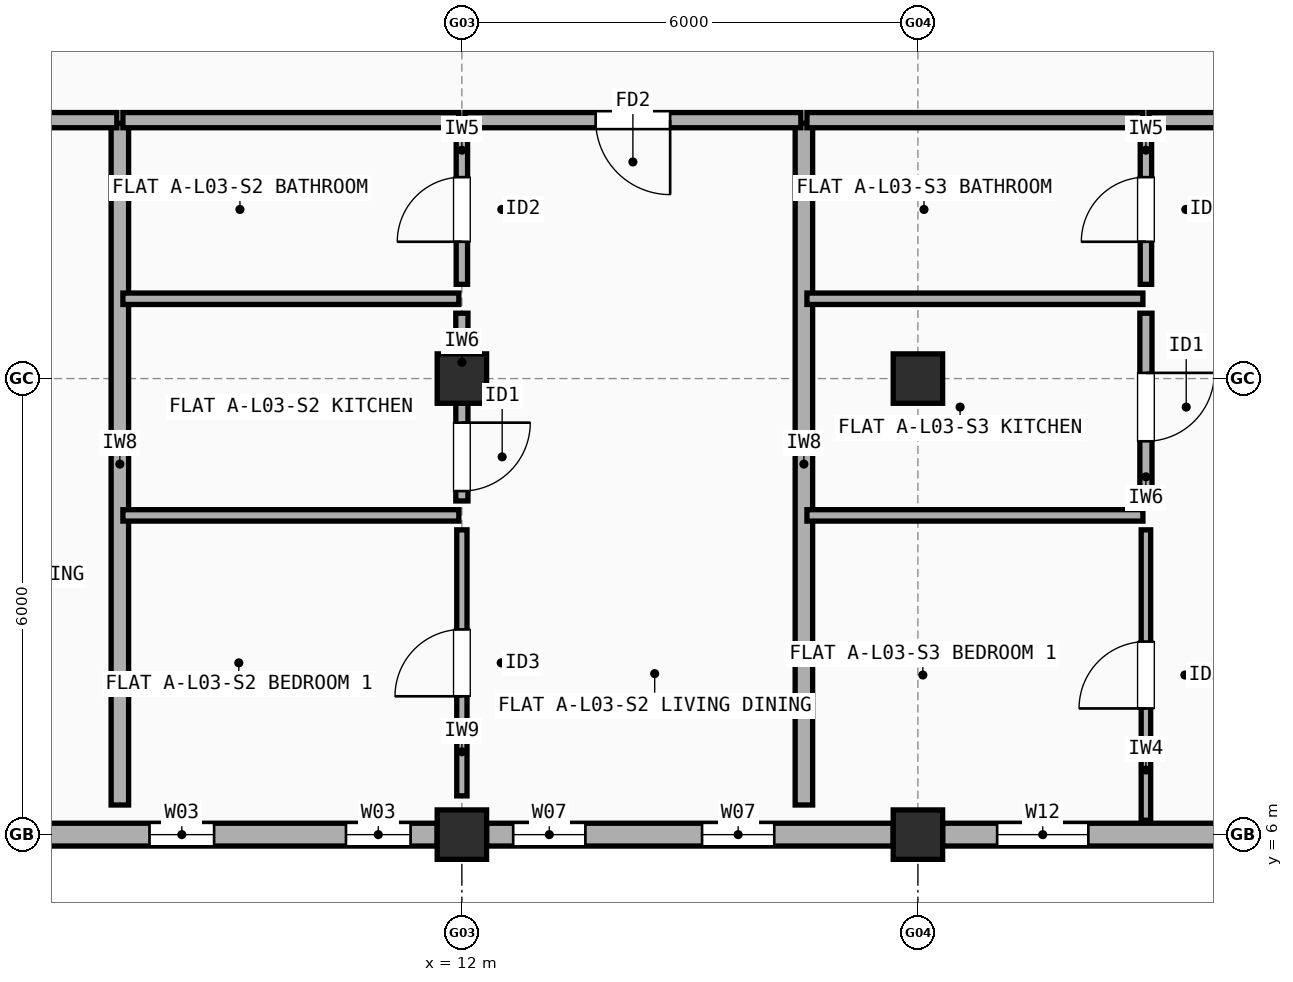
"""IFC4 building model, lengths in metres.
Left out: names, types, materials, properties, quantities, classifications, styles, units other than length and angle.
Written with IfcOpenShell. Run it as: python <this file> out.ifc"""

import sys

from ifc_helpers import new_model, si_unit, direction, frame, frame_2d, origin, origin_2d, place, context, subcontext, project, spatial, rectangle, extrude, element, fill, save


model = new_model("IFC4")
c1 = context("Model", 3, precision=1e-05, world=origin(), true_north=direction((0.0, 1.0)))
c2 = subcontext(c1, "Body", "Model", "MODEL_VIEW")
j1 = project(units=[si_unit("LENGTHUNIT", "METRE"), si_unit("PLANEANGLEUNIT", "RADIAN")], contexts=[c1])
p1 = place(None, origin())
s1 = spatial("IfcSite", under=j1, at=p1, CompositionType="ELEMENT")
p2 = place(p1, origin())
s2 = spatial("IfcBuilding", under=s1, at=p2, CompositionType="ELEMENT")
p3 = place(p2, frame((0.0, 0.0, 10.9)))
s3 = spatial("IfcBuildingStorey", under=s2, at=p3, CompositionType="ELEMENT", Elevation=10.9)
for number, where, z_axis, x_axis in (
    (1, (12.0, 6.0, 0.0), (0.0, 0.0, 1.0), (1.0, 0.0, 0.0)),
    (2, (12.0, 12.0, 0.0), (0.0, 0.0, 1.0), (1.0, 0.0, 0.0)),
    (3, (18.0, 6.0, 0.0), (0.0, 0.0, 1.0), (1.0, 0.0, 0.0)),
    (4, (18.0, 12.0, 0.0), (0.0, 0.0, 1.0), (1.0, 0.0, 0.0)),
):
    element("IfcColumn", number, at=place(p3, frame(where, z_axis=z_axis, x_axis=x_axis)), inside=s3, PredefinedType="COLUMN", context=c2, shape_type="SweptSolid", body=[
        extrude(rectangle(XDim=0.65, YDim=0.65, at=origin_2d()), origin(), (0.0, 0.0, 1.0), 2.96),
    ])
p4 = place(p3, frame((6.325, 6.0, 0.0), z_axis=(0.0, 0.0, 1.0), x_axis=(1.0, 0.0, 0.0)))
e5 = element("IfcWall", 5, at=p4, inside=s3, PredefinedType="STANDARD", context=c2, shape_type="SweptSolid", body=[
    extrude(rectangle(XDim=5.35, YDim=0.3, at=frame_2d((2.675, 0.0))), origin(), (0.0, 0.0, 1.0), 2.442),
])
p5 = place(p4, frame((1.565, 0.0, 0.9)))
e6 = element("IfcOpeningElement", 6, at=p5, cuts=e5, PredefinedType="OPENING", context=c2, shape_type="SweptSolid", body=[
    extrude(rectangle(XDim=0.85, YDim=1.25, at=frame_2d((0.425, 0.625))), frame((0.0, 0.16, 0.0), z_axis=(0.0, -1.0, 0.0), x_axis=(1.0, 0.0, 0.0)), (0.0, 0.0, 1.0), 0.32),
])
p6 = place(p4, frame((4.15, 0.0, 0.9)))
e7 = element("IfcOpeningElement", 7, at=p6, cuts=e5, PredefinedType="OPENING", context=c2, shape_type="SweptSolid", body=[
    extrude(rectangle(XDim=0.85, YDim=1.25, at=frame_2d((0.425, 0.625))), frame((0.0, 0.16, 0.0), z_axis=(0.0, -1.0, 0.0), x_axis=(1.0, 0.0, 0.0)), (0.0, 0.0, 1.0), 0.32),
])
p7 = place(p3, frame((12.325, 6.0, 0.0), z_axis=(0.0, 0.0, 1.0), x_axis=(1.0, 0.0, 0.0)))
e8 = element("IfcWall", 8, at=p7, inside=s3, PredefinedType="STANDARD", context=c2, shape_type="SweptSolid", body=[
    extrude(rectangle(XDim=5.35, YDim=0.3, at=frame_2d((2.675, 0.0))), origin(), (0.0, 0.0, 1.0), 2.442),
])
p8 = place(p7, frame((0.35, 0.0, 0.9)))
e9 = element("IfcOpeningElement", 9, at=p8, cuts=e8, PredefinedType="OPENING", context=c2, shape_type="SweptSolid", body=[
    extrude(rectangle(XDim=0.95, YDim=1.35, at=frame_2d((0.475, 0.675))), frame((0.0, 0.16, 0.0), z_axis=(0.0, -1.0, 0.0), x_axis=(1.0, 0.0, 0.0)), (0.0, 0.0, 1.0), 0.32),
])
p9 = place(p7, frame((2.835, 0.0, 0.9)))
e10 = element("IfcOpeningElement", 10, at=p9, cuts=e8, PredefinedType="OPENING", context=c2, shape_type="SweptSolid", body=[
    extrude(rectangle(XDim=0.95, YDim=1.35, at=frame_2d((0.475, 0.675))), frame((0.0, 0.16, 0.0), z_axis=(0.0, -1.0, 0.0), x_axis=(1.0, 0.0, 0.0)), (0.0, 0.0, 1.0), 0.32),
])
p10 = place(p3, frame((18.325, 6.0, 0.0), z_axis=(0.0, 0.0, 1.0), x_axis=(1.0, 0.0, 0.0)))
e11 = element("IfcWall", 11, at=p10, inside=s3, PredefinedType="STANDARD", context=c2, shape_type="SweptSolid", body=[
    extrude(rectangle(XDim=5.35, YDim=0.3, at=frame_2d((2.675, 0.0))), origin(), (0.0, 0.0, 1.0), 2.442),
])
p11 = place(p10, frame((0.718, 0.0, 0.9)))
e12 = element("IfcOpeningElement", 12, at=p11, cuts=e11, PredefinedType="OPENING", context=c2, shape_type="SweptSolid", body=[
    extrude(rectangle(XDim=1.2, YDim=1.35, at=frame_2d((0.6, 0.675))), frame((0.0, 0.16, 0.0), z_axis=(0.0, -1.0, 0.0), x_axis=(1.0, 0.0, 0.0)), (0.0, 0.0, 1.0), 0.32),
])
p12 = place(p10, frame((3.633, 0.0, 0.9)))
e13 = element("IfcOpeningElement", 13, at=p12, cuts=e11, PredefinedType="OPENING", context=c2, shape_type="SweptSolid", body=[
    extrude(rectangle(XDim=0.8, YDim=1.2, at=frame_2d((0.4, 0.6))), frame((0.0, 0.16, 0.0), z_axis=(0.0, -1.0, 0.0), x_axis=(1.0, 0.0, 0.0)), (0.0, 0.0, 1.0), 0.32),
])
p13 = place(p3, frame((7.5, 6.39, 0.0), z_axis=(0.0, 0.0, 1.0), x_axis=(0.0, 1.0, 0.0)))
e14 = element("IfcWall", 14, at=p13, inside=s3, PredefinedType="SOLIDWALL", context=c2, shape_type="SweptSolid", body=[
    extrude(rectangle(XDim=8.97, YDim=0.23, at=frame_2d((4.485, 0.0))), origin(), (0.0, 0.0, 1.0), 2.548),
])
p14 = place(p3, frame((3.04, 15.4, 0.0), z_axis=(0.0, 0.0, 1.0), x_axis=(1.0, 0.0, 0.0)))
e15 = element("IfcWall", 15, at=p14, inside=s3, PredefinedType="SOLIDWALL", context=c2, shape_type="SweptSolid", body=[
    extrude(rectangle(XDim=4.42, YDim=0.2, at=frame_2d((2.21, 0.0))), origin(), (0.0, 0.0, 1.0), 2.508),
])
p15 = place(p14, frame((1.71, 0.0, 0.0)))
e16 = element("IfcOpeningElement", 16, at=p15, cuts=e15, PredefinedType="OPENING", context=c2, shape_type="SweptSolid", body=[
    extrude(rectangle(XDim=1.0, YDim=2.15, at=frame_2d((0.5, 1.075))), frame((0.0, 0.11, 0.0), z_axis=(0.0, -1.0, 0.0), x_axis=(1.0, 0.0, 0.0)), (0.0, 0.0, 1.0), 0.22),
])
p16 = place(p3, frame((16.5, 6.39, 0.0), z_axis=(0.0, 0.0, 1.0), x_axis=(0.0, 1.0, 0.0)))
e17 = element("IfcWall", 17, at=p16, inside=s3, PredefinedType="SOLIDWALL", context=c2, shape_type="SweptSolid", body=[
    extrude(rectangle(XDim=8.97, YDim=0.23, at=frame_2d((4.485, 0.0))), origin(), (0.0, 0.0, 1.0), 2.508),
])
p17 = place(p3, frame((7.54, 15.4, 0.0), z_axis=(0.0, 0.0, 1.0), x_axis=(1.0, 0.0, 0.0)))
e18 = element("IfcWall", 18, at=p17, inside=s3, PredefinedType="SOLIDWALL", context=c2, shape_type="SweptSolid", body=[
    extrude(rectangle(XDim=4.42, YDim=0.2, at=frame_2d((2.21, 0.0))), origin(), (0.0, 0.0, 1.0), 2.458),
])
p18 = place(p3, frame((12.04, 15.4, 0.0), z_axis=(0.0, 0.0, 1.0), x_axis=(1.0, 0.0, 0.0)))
e19 = element("IfcWall", 19, at=p18, inside=s3, PredefinedType="SOLIDWALL", context=c2, shape_type="SweptSolid", body=[
    extrude(rectangle(XDim=4.42, YDim=0.2, at=frame_2d((2.21, 0.0))), origin(), (0.0, 0.0, 1.0), 2.458),
])
p19 = place(p18, frame((1.72, 0.0, 0.0)))
e20 = element("IfcOpeningElement", 20, at=p19, cuts=e19, PredefinedType="OPENING", context=c2, shape_type="SweptSolid", body=[
    extrude(rectangle(XDim=0.98, YDim=2.15, at=frame_2d((0.49, 1.075))), frame((0.0, 0.11, 0.0), z_axis=(0.0, -1.0, 0.0), x_axis=(1.0, 0.0, 0.0)), (0.0, 0.0, 1.0), 0.22),
])
p20 = place(p3, frame((12.0, 6.51, 0.0), z_axis=(0.0, 0.0, 1.0), x_axis=(0.0, 1.0, 0.0)))
e21 = element("IfcWall", 21, at=p20, inside=s3, PredefinedType="PARTITIONING", context=c2, shape_type="SweptSolid", body=[
    extrude(rectangle(XDim=3.5, YDim=0.135, at=frame_2d((1.75, 0.0))), origin(), (0.0, 0.0, 1.0), 2.508),
])
p21 = place(p20, frame((1.31, 0.0, 0.0)))
e22 = element("IfcOpeningElement", 22, at=p21, cuts=e21, PredefinedType="OPENING", context=c2, shape_type="SweptSolid", body=[
    extrude(rectangle(XDim=0.88, YDim=2.1, at=frame_2d((0.44, 1.05))), frame((0.0, 0.077, 0.0), z_axis=(0.0, -1.0, 0.0), x_axis=(1.0, 0.0, 0.0)), (0.0, 0.0, 1.0), 0.155),
])
p22 = place(p3, frame((12.0, 10.39, 0.0), z_axis=(0.0, 0.0, 1.0), x_axis=(0.0, 1.0, 0.0)))
e23 = element("IfcWall", 23, at=p22, inside=s3, PredefinedType="PLUMBINGWALL", context=c2, shape_type="SweptSolid", body=[
    extrude(rectangle(XDim=2.47, YDim=0.16, at=frame_2d((1.235, 0.0))), origin(), (0.0, 0.0, 1.0), 2.458),
])
p23 = place(p22, frame((0.13, 0.0, 0.0)))
e24 = element("IfcOpeningElement", 24, at=p23, cuts=e23, PredefinedType="OPENING", context=c2, shape_type="SweptSolid", body=[
    extrude(rectangle(XDim=0.9, YDim=2.1, at=frame_2d((0.45, 1.05))), frame((0.0, 0.09, 0.0), z_axis=(0.0, -1.0, 0.0), x_axis=(1.0, 0.0, 0.0)), (0.0, 0.0, 1.0), 0.18),
])
p24 = place(p3, frame((12.0, 13.24, 0.0), z_axis=(0.0, 0.0, 1.0), x_axis=(0.0, 1.0, 0.0)))
e25 = element("IfcWall", 25, at=p24, inside=s3, PredefinedType="PARTITIONING", context=c2, shape_type="SweptSolid", body=[
    extrude(rectangle(XDim=1.97, YDim=0.15, at=frame_2d((0.985, 0.0))), origin(), (0.0, 0.0, 1.0), 2.458),
])
p25 = place(p24, frame((0.56, 0.0, 0.0)))
e26 = element("IfcOpeningElement", 26, at=p25, cuts=e25, PredefinedType="OPENING", context=c2, shape_type="SweptSolid", body=[
    extrude(rectangle(XDim=0.85, YDim=2.1, at=frame_2d((0.425, 1.05))), frame((0.0, 0.085, 0.0), z_axis=(0.0, -1.0, 0.0), x_axis=(1.0, 0.0, 0.0)), (0.0, 0.0, 1.0), 0.17),
])
p26 = place(p3, frame((7.54, 10.2, 0.0), z_axis=(0.0, 0.0, 1.0), x_axis=(1.0, 0.0, 0.0)))
e27 = element("IfcWall", 27, at=p26, inside=s3, PredefinedType="PARTITIONING", context=c2, shape_type="SweptSolid", body=[
    extrude(rectangle(XDim=4.42, YDim=0.15, at=frame_2d((2.21, 0.0))), origin(), (0.0, 0.0, 1.0), 2.508),
])
p27 = place(p3, frame((7.54, 13.05, 0.0), z_axis=(0.0, 0.0, 1.0), x_axis=(1.0, 0.0, 0.0)))
e28 = element("IfcWall", 28, at=p27, inside=s3, PredefinedType="PARTITIONING", context=c2, shape_type="SweptSolid", body=[
    extrude(rectangle(XDim=4.42, YDim=0.15, at=frame_2d((2.21, 0.0))), origin(), (0.0, 0.0, 1.0), 2.458),
])
p28 = place(p3, frame((16.54, 15.4, 0.0), z_axis=(0.0, 0.0, 1.0), x_axis=(1.0, 0.0, 0.0)))
e29 = element("IfcWall", 29, at=p28, inside=s3, PredefinedType="SOLIDWALL", context=c2, shape_type="SweptSolid", body=[
    extrude(rectangle(XDim=4.42, YDim=0.2, at=frame_2d((2.21, 0.0))), origin(), (0.0, 0.0, 1.0), 2.508),
])
p29 = place(p3, frame((21.04, 15.4, 0.0), z_axis=(0.0, 0.0, 1.0), x_axis=(1.0, 0.0, 0.0)))
e30 = element("IfcWall", 30, at=p29, inside=s3, PredefinedType="SOLIDWALL", context=c2, shape_type="SweptSolid", body=[
    extrude(rectangle(XDim=4.42, YDim=0.2, at=frame_2d((2.21, 0.0))), origin(), (0.0, 0.0, 1.0), 2.458),
])
p30 = place(p29, frame((1.685, 0.0, 0.0)))
e31 = element("IfcOpeningElement", 31, at=p30, cuts=e30, PredefinedType="OPENING", context=c2, shape_type="SweptSolid", body=[
    extrude(rectangle(XDim=1.05, YDim=2.15, at=frame_2d((0.525, 1.075))), frame((0.0, 0.11, 0.0), z_axis=(0.0, -1.0, 0.0), x_axis=(1.0, 0.0, 0.0)), (0.0, 0.0, 1.0), 0.22),
])
p31 = place(p3, frame((21.0, 6.19, 0.0), z_axis=(0.0, 0.0, 1.0), x_axis=(0.0, 1.0, 0.0)))
e32 = element("IfcWall", 32, at=p31, inside=s3, PredefinedType="PARTITIONING", context=c2, shape_type="SweptSolid", body=[
    extrude(rectangle(XDim=3.82, YDim=0.125, at=frame_2d((1.91, 0.0))), origin(), (0.0, 0.0, 1.0), 2.96),
])
p32 = place(p31, frame((1.47, 0.0, 0.0)))
e33 = element("IfcOpeningElement", 33, at=p32, cuts=e32, PredefinedType="OPENING", context=c2, shape_type="SweptSolid", body=[
    extrude(rectangle(XDim=0.88, YDim=2.1, at=frame_2d((0.44, 1.05))), frame((0.0, 0.073, 0.0), z_axis=(0.0, -1.0, 0.0), x_axis=(1.0, 0.0, 0.0)), (0.0, 0.0, 1.0), 0.145),
])
p33 = place(p3, frame((21.0, 10.39, 0.0), z_axis=(0.0, 0.0, 1.0), x_axis=(0.0, 1.0, 0.0)))
e34 = element("IfcWall", 34, at=p33, inside=s3, PredefinedType="PLUMBINGWALL", context=c2, shape_type="SweptSolid", body=[
    extrude(rectangle(XDim=2.47, YDim=0.16, at=frame_2d((1.235, 0.0))), origin(), (0.0, 0.0, 1.0), 2.408),
])
p34 = place(p33, frame((0.785, 0.0, 0.0)))
e35 = element("IfcOpeningElement", 35, at=p34, cuts=e34, PredefinedType="OPENING", context=c2, shape_type="SweptSolid", body=[
    extrude(rectangle(XDim=0.9, YDim=2.1, at=frame_2d((0.45, 1.05))), frame((0.0, 0.09, 0.0), z_axis=(0.0, -1.0, 0.0), x_axis=(1.0, 0.0, 0.0)), (0.0, 0.0, 1.0), 0.18),
])
p35 = place(p3, frame((21.0, 13.24, 0.0), z_axis=(0.0, 0.0, 1.0), x_axis=(0.0, 1.0, 0.0)))
e36 = element("IfcWall", 36, at=p35, inside=s3, PredefinedType="PARTITIONING", context=c2, shape_type="SweptSolid", body=[
    extrude(rectangle(XDim=1.97, YDim=0.15, at=frame_2d((0.985, 0.0))), origin(), (0.0, 0.0, 1.0), 2.96),
])
p36 = place(p35, frame((0.56, 0.0, 0.0)))
e37 = element("IfcOpeningElement", 37, at=p36, cuts=e36, PredefinedType="OPENING", context=c2, shape_type="SweptSolid", body=[
    extrude(rectangle(XDim=0.85, YDim=2.1, at=frame_2d((0.425, 1.05))), frame((0.0, 0.085, 0.0), z_axis=(0.0, -1.0, 0.0), x_axis=(1.0, 0.0, 0.0)), (0.0, 0.0, 1.0), 0.17),
])
p37 = place(p3, frame((16.54, 10.2, 0.0), z_axis=(0.0, 0.0, 1.0), x_axis=(1.0, 0.0, 0.0)))
e38 = element("IfcWall", 38, at=p37, inside=s3, PredefinedType="PARTITIONING", context=c2, shape_type="SweptSolid", body=[
    extrude(rectangle(XDim=4.42, YDim=0.15, at=frame_2d((2.21, 0.0))), origin(), (0.0, 0.0, 1.0), 2.548),
])
p38 = place(p3, frame((16.54, 13.05, 0.0), z_axis=(0.0, 0.0, 1.0), x_axis=(1.0, 0.0, 0.0)))
e39 = element("IfcWall", 39, at=p38, inside=s3, PredefinedType="PARTITIONING", context=c2, shape_type="SweptSolid", body=[
    extrude(rectangle(XDim=4.42, YDim=0.15, at=frame_2d((2.21, 0.0))), origin(), (0.0, 0.0, 1.0), 2.508),
])
p39 = place(p5, origin())
e40 = element("IfcWindow", 40, at=p39, inside=s3, PartitioningType="SINGLE_PANEL", PredefinedType="WINDOW", context=c2, shape_type="SweptSolid", body=[
    extrude(rectangle(XDim=0.85, YDim=1.25, at=frame_2d((0.425, 0.625))), frame((0.0, 0.03, 0.0), z_axis=(0.0, -1.0, 0.0), x_axis=(1.0, 0.0, 0.0)), (0.0, 0.0, 1.0), 0.06),
])
fill(e6, e40)
p40 = place(p6, origin())
e41 = element("IfcWindow", 41, at=p40, inside=s3, PartitioningType="SINGLE_PANEL", PredefinedType="WINDOW", context=c2, shape_type="SweptSolid", body=[
    extrude(rectangle(XDim=0.85, YDim=1.25, at=frame_2d((0.425, 0.625))), frame((0.0, 0.03, 0.0), z_axis=(0.0, -1.0, 0.0), x_axis=(1.0, 0.0, 0.0)), (0.0, 0.0, 1.0), 0.06),
])
fill(e7, e41)
p41 = place(p8, origin())
e42 = element("IfcWindow", 42, at=p41, inside=s3, PartitioningType="SINGLE_PANEL", PredefinedType="WINDOW", context=c2, shape_type="SweptSolid", body=[
    extrude(rectangle(XDim=0.95, YDim=1.35, at=frame_2d((0.475, 0.675))), frame((0.0, 0.03, 0.0), z_axis=(0.0, -1.0, 0.0), x_axis=(1.0, 0.0, 0.0)), (0.0, 0.0, 1.0), 0.06),
])
fill(e9, e42)
p42 = place(p9, origin())
e43 = element("IfcWindow", 43, at=p42, inside=s3, PartitioningType="SINGLE_PANEL", PredefinedType="WINDOW", context=c2, shape_type="SweptSolid", body=[
    extrude(rectangle(XDim=0.95, YDim=1.35, at=frame_2d((0.475, 0.675))), frame((0.0, 0.03, 0.0), z_axis=(0.0, -1.0, 0.0), x_axis=(1.0, 0.0, 0.0)), (0.0, 0.0, 1.0), 0.06),
])
fill(e10, e43)
p43 = place(p11, origin())
e44 = element("IfcWindow", 44, at=p43, inside=s3, PartitioningType="SINGLE_PANEL", PredefinedType="WINDOW", context=c2, shape_type="SweptSolid", body=[
    extrude(rectangle(XDim=1.2, YDim=1.35, at=frame_2d((0.6, 0.675))), frame((0.0, 0.03, 0.0), z_axis=(0.0, -1.0, 0.0), x_axis=(1.0, 0.0, 0.0)), (0.0, 0.0, 1.0), 0.06),
])
fill(e12, e44)
p44 = place(p19, origin())
e45 = element("IfcDoor", 45, at=p44, inside=s3, OperationType="SINGLE_SWING_RIGHT", PredefinedType="DOOR", context=c2, shape_type="SweptSolid", body=[
    extrude(rectangle(XDim=0.98, YDim=2.15, at=frame_2d((0.49, 1.075))), frame((0.0, 0.025, 0.0), z_axis=(0.0, -1.0, 0.0), x_axis=(1.0, 0.0, 0.0)), (0.0, 0.0, 1.0), 0.05),
])
fill(e20, e45)
p45 = place(p21, origin())
e46 = element("IfcDoor", 46, at=p45, inside=s3, OperationType="SINGLE_SWING_LEFT", PredefinedType="DOOR", context=c2, shape_type="SweptSolid", body=[
    extrude(rectangle(XDim=0.88, YDim=2.1, at=frame_2d((0.44, 1.05))), frame((0.0, 0.025, 0.0), z_axis=(0.0, -1.0, 0.0), x_axis=(1.0, 0.0, 0.0)), (0.0, 0.0, 1.0), 0.05),
])
fill(e22, e46)
p46 = place(p23, origin())
e47 = element("IfcDoor", 47, at=p46, inside=s3, OperationType="SINGLE_SWING_RIGHT", PredefinedType="DOOR", context=c2, shape_type="SweptSolid", body=[
    extrude(rectangle(XDim=0.9, YDim=2.1, at=frame_2d((0.45, 1.05))), frame((0.0, 0.025, 0.0), z_axis=(0.0, -1.0, 0.0), x_axis=(1.0, 0.0, 0.0)), (0.0, 0.0, 1.0), 0.05),
])
fill(e24, e47)
p47 = place(p25, origin())
e48 = element("IfcDoor", 48, at=p47, inside=s3, OperationType="SINGLE_SWING_LEFT", PredefinedType="DOOR", context=c2, shape_type="SweptSolid", body=[
    extrude(rectangle(XDim=0.85, YDim=2.1, at=frame_2d((0.425, 1.05))), frame((0.0, 0.025, 0.0), z_axis=(0.0, -1.0, 0.0), x_axis=(1.0, 0.0, 0.0)), (0.0, 0.0, 1.0), 0.05),
])
fill(e26, e48)
p48 = place(p32, origin())
e49 = element("IfcDoor", 49, at=p48, inside=s3, OperationType="SINGLE_SWING_LEFT", PredefinedType="DOOR", context=c2, shape_type="SweptSolid", body=[
    extrude(rectangle(XDim=0.88, YDim=2.1, at=frame_2d((0.44, 1.05))), frame((0.0, 0.025, 0.0), z_axis=(0.0, -1.0, 0.0), x_axis=(1.0, 0.0, 0.0)), (0.0, 0.0, 1.0), 0.05),
])
fill(e33, e49)
p49 = place(p34, origin())
e50 = element("IfcDoor", 50, at=p49, inside=s3, OperationType="SINGLE_SWING_RIGHT", PredefinedType="DOOR", context=c2, shape_type="SweptSolid", body=[
    extrude(rectangle(XDim=0.9, YDim=2.1, at=frame_2d((0.45, 1.05))), frame((0.0, 0.025, 0.0), z_axis=(0.0, -1.0, 0.0), x_axis=(1.0, 0.0, 0.0)), (0.0, 0.0, 1.0), 0.05),
])
fill(e35, e50)
p50 = place(p36, origin())
e51 = element("IfcDoor", 51, at=p50, inside=s3, OperationType="SINGLE_SWING_LEFT", PredefinedType="DOOR", context=c2, shape_type="SweptSolid", body=[
    extrude(rectangle(XDim=0.85, YDim=2.1, at=frame_2d((0.425, 1.05))), frame((0.0, 0.025, 0.0), z_axis=(0.0, -1.0, 0.0), x_axis=(1.0, 0.0, 0.0)), (0.0, 0.0, 1.0), 0.05),
])
fill(e37, e51)
save(model, sys.argv[1])
